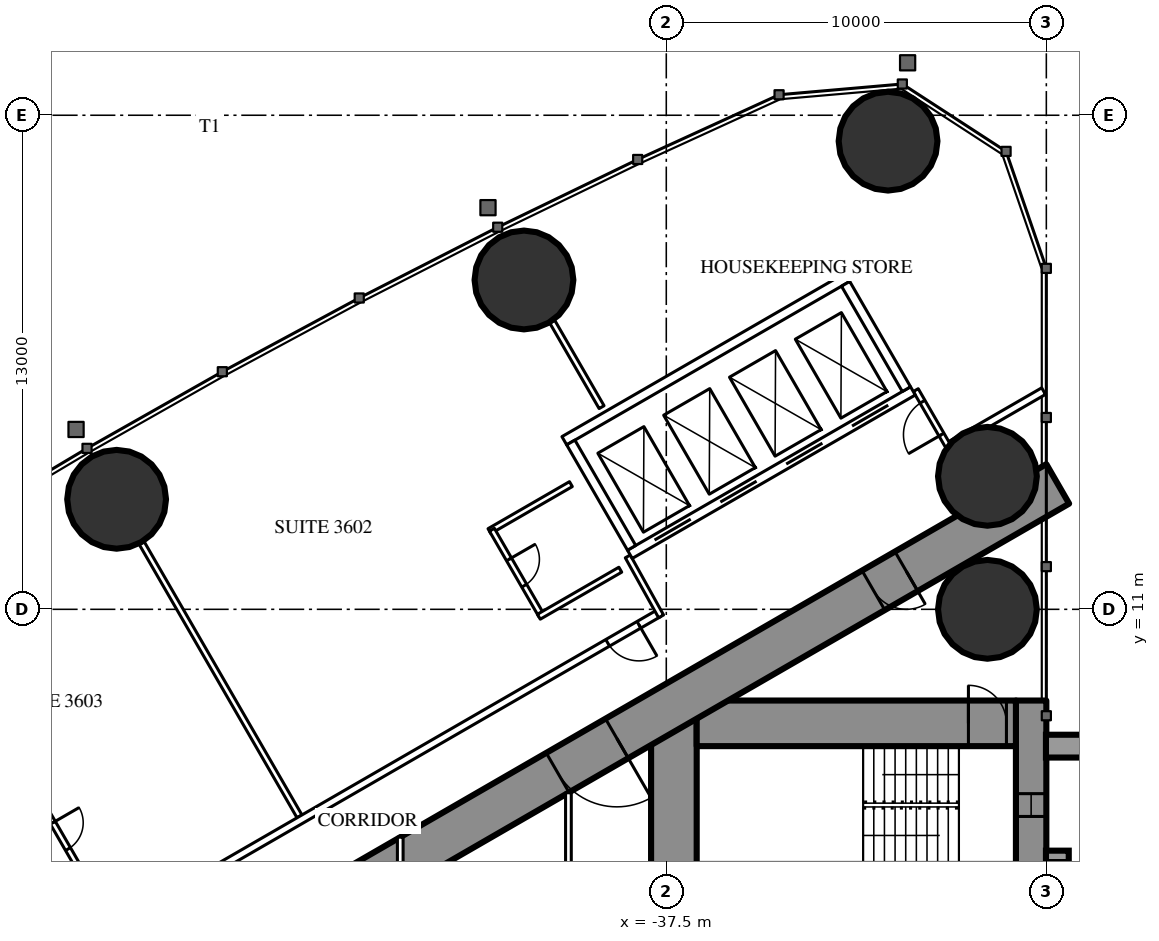
"""IFC4 building model, lengths in metres.
Left out: names, types, materials, properties, quantities, classifications, styles, units other than length and angle.
Written with IfcOpenShell. Run it as: python <this file> out.ifc"""

import sys

from ifc_helpers import new_model, si_unit, direction, frame, frame_2d, origin, origin_2d, place, context, subcontext, project, spatial, rectangle, hollow_circle, extrude, element, fill, save


model = new_model("IFC4")
c1 = context("Model", 3, precision=1e-05, world=origin(), true_north=direction((0.0, 1.0)))
c2 = subcontext(c1, "Body", "Model", "MODEL_VIEW")
j1 = project(units=[si_unit("LENGTHUNIT", "METRE"), si_unit("PLANEANGLEUNIT", "RADIAN")], contexts=[c1])
p1 = place(None, origin())
s1 = spatial("IfcSite", under=j1, at=p1, CompositionType="ELEMENT")
p2 = place(p1, origin())
s2 = spatial("IfcBuilding", under=s1, at=p2, CompositionType="ELEMENT")
p3 = place(p2, frame((0.0, 0.0, 136.1)))
s3 = spatial("IfcBuildingStorey", under=s2, at=p3, CompositionType="ELEMENT", Elevation=136.1)
for number, where, z_axis, x_axis in (
    (1, (-31.665, 23.318, 0.0), (0.0, 0.0, 1.0), (1.0, 0.0, 0.0)),
    (2, (-29.05, 11.0, 0.0), (0.0, 0.0, 1.0), (1.0, 0.0, 0.0)),
    (3, (-29.05, 14.5, 0.0), (0.0, 0.0, 1.0), (1.0, 0.0, 0.0)),
    (4, (-41.245, 19.666, 0.0), (0.0, 0.0, 1.0), (1.0, 0.0, 0.0)),
    (5, (-51.963, 13.895, 0.0), (0.0, 0.0, 1.0), (1.0, 0.0, 0.0)),
):
    element("IfcColumn", number, at=place(p3, frame(where, z_axis=z_axis, x_axis=x_axis)), inside=s3, PredefinedType="COLUMN", context=c2, shape_type="SweptSolid", body=[
        extrude(hollow_circle(Radius=1.3, WallThickness=0.1, at=origin_2d()), origin(), (0.0, 0.0, 1.0), 3.5),
    ])
p4 = place(p3, frame((-27.9, 8.6, 0.0), z_axis=(0.0, 0.0, 1.0), x_axis=(0.0, -1.0, 0.0)))
e6 = element("IfcWall", 6, at=p4, inside=s3, PredefinedType="SHEAR", context=c2, shape_type="SweptSolid", body=[
    extrude(rectangle(XDim=17.2, YDim=0.8, at=frame_2d((8.6, 0.0))), origin(), (0.0, 0.0, 1.0), 3.5),
])
p5 = place(p4, frame((2.45, 0.0, 0.6)))
e7 = element("IfcOpeningElement", 7, at=p5, cuts=e6, PredefinedType="OPENING", context=c2, shape_type="SweptSolid", body=[
    extrude(rectangle(XDim=0.6, YDim=2.1, at=frame_2d((0.3, 1.05))), frame((0.0, 0.41, 0.0), z_axis=(0.0, -1.0, 0.0), x_axis=(1.0, 0.0, 0.0)), (0.0, 0.0, 1.0), 0.82),
])
p6 = place(p4, frame((14.15, 0.0, 0.6)))
e8 = element("IfcOpeningElement", 8, at=p6, cuts=e6, PredefinedType="OPENING", context=c2, shape_type="SweptSolid", body=[
    extrude(rectangle(XDim=0.6, YDim=2.1, at=frame_2d((0.3, 1.05))), frame((0.0, 0.41, 0.0), z_axis=(0.0, -1.0, 0.0), x_axis=(1.0, 0.0, 0.0)), (0.0, 0.0, 1.0), 0.82),
])
p7 = place(p3, frame((-37.3, 8.6, 0.0), z_axis=(0.0, 0.0, 1.0), x_axis=(0.0, -1.0, 0.0)))
e9 = element("IfcWall", 9, at=p7, inside=s3, PredefinedType="SHEAR", context=c2, shape_type="SweptSolid", body=[
    extrude(rectangle(XDim=17.2, YDim=1.2, at=frame_2d((8.6, 0.0))), origin(), (0.0, 0.0, 1.0), 3.5),
])
p8 = place(p7, frame((7.7, 0.0, 0.0)))
e10 = element("IfcOpeningElement", 10, at=p8, cuts=e9, PredefinedType="OPENING", context=c2, shape_type="SweptSolid", body=[
    extrude(rectangle(XDim=1.8, YDim=2.2, at=frame_2d((0.9, 1.1))), frame((0.0, 0.61, 0.0), z_axis=(0.0, -1.0, 0.0), x_axis=(1.0, 0.0, 0.0)), (0.0, 0.0, 1.0), 1.22),
])
p9 = place(p3, frame((-28.3, 8.0, 0.0), z_axis=(0.0, 0.0, 1.0), x_axis=(-1.0, 0.0, 0.0)))
e11 = element("IfcWall", 11, at=p9, inside=s3, PredefinedType="SHEAR", context=c2, shape_type="SweptSolid", body=[
    extrude(rectangle(XDim=8.4, YDim=1.2, at=frame_2d((4.2, 0.0))), origin(), (0.0, 0.0, 1.0), 3.5),
])
p10 = place(p9, frame((0.25, 0.0, 0.0)))
e12 = element("IfcOpeningElement", 12, at=p10, cuts=e11, PredefinedType="OPENING", context=c2, shape_type="SweptSolid", body=[
    extrude(rectangle(XDim=1.0, YDim=2.2, at=frame_2d((0.5, 1.1))), frame((0.0, 0.61, 0.0), z_axis=(0.0, -1.0, 0.0), x_axis=(1.0, 0.0, 0.0)), (0.0, 0.0, 1.0), 1.22),
])
p11 = place(p3, frame((-27.2, 14.3, 0.0), z_axis=(0.0, 0.0, 1.0), x_axis=(-0.866026593062, -0.499997940104, 0.0)))
e13 = element("IfcWall", 13, at=p11, inside=s3, PredefinedType="SHEAR", context=c2, shape_type="SweptSolid", body=[
    extrude(rectangle(XDim=28.946, YDim=1.2, at=frame_2d((14.473, 0.0))), origin(), (0.0, 0.0, 1.0), 3.5),
])
p12 = place(p11, frame((4.6, 0.0, 0.0)))
e14 = element("IfcOpeningElement", 14, at=p12, cuts=e13, PredefinedType="OPENING", context=c2, shape_type="SweptSolid", body=[
    extrude(rectangle(XDim=1.0, YDim=2.2, at=frame_2d((0.5, 1.1))), frame((0.0, 0.61, 0.0), z_axis=(0.0, -1.0, 0.0), x_axis=(1.0, 0.0, 0.0)), (0.0, 0.0, 1.0), 1.22),
])
p13 = place(p11, frame((13.395, 0.0, 0.0)))
e15 = element("IfcOpeningElement", 15, at=p13, cuts=e13, PredefinedType="OPENING", context=c2, shape_type="SweptSolid", body=[
    extrude(rectangle(XDim=1.8, YDim=2.2, at=frame_2d((0.9, 1.1))), frame((0.0, 0.61, 0.0), z_axis=(0.0, -1.0, 0.0), x_axis=(1.0, 0.0, 0.0)), (0.0, 0.0, 1.0), 1.22),
])
p14 = place(p3, frame((-47.151, 5.552, 0.0), z_axis=(0.0, 0.0, 1.0), x_axis=(-0.500003012045, 0.866023664773, 0.0)))
e16 = element("IfcWall", 16, at=p14, inside=s3, PredefinedType="PARTITIONING", context=c2, shape_type="SweptSolid", body=[
    extrude(rectangle(XDim=8.311, YDim=0.15, at=frame_2d((4.156, 0.0))), origin(), (0.0, 0.0, 1.0), 2.2),
])
p15 = place(p3, frame((-39.202, 16.32, 0.0), z_axis=(0.0, 0.0, 1.0), x_axis=(-0.499947391036, 0.866055775454, 0.0)))
e17 = element("IfcWall", 17, at=p15, inside=s3, PredefinedType="PARTITIONING", context=c2, shape_type="SweptSolid", body=[
    extrude(rectangle(XDim=2.599, YDim=0.15, at=frame_2d((1.3, 0.0))), origin(), (0.0, 0.0, 1.0), 3.25),
])
p16 = place(p3, frame((-27.572, 16.741, 0.0), z_axis=(0.0, 0.0, 1.0), x_axis=(-0.866034618596, -0.499984039138, 0.0)))
e18 = element("IfcWall", 18, at=p16, inside=s3, PredefinedType="PARTITIONING", context=c2, shape_type="SweptSolid", body=[
    extrude(rectangle(XDim=2.854, YDim=0.2, at=frame_2d((1.427, 0.0))), origin(), (0.0, 0.0, 1.0), 3.25),
])
p17 = place(p3, frame((-37.7, 10.894, 0.0), z_axis=(0.0, 0.0, 1.0), x_axis=(-0.866027905338, -0.499995667157, 0.0)))
e19 = element("IfcWall", 19, at=p17, inside=s3, PredefinedType="PARTITIONING", context=c2, shape_type="SweptSolid", body=[
    extrude(rectangle(XDim=21.787, YDim=0.2, at=frame_2d((10.894, 0.0))), origin(), (0.0, 0.0, 1.0), 3.25),
])
p18 = place(p17, frame((17.711, 0.0, 0.0)))
e20 = element("IfcOpeningElement", 20, at=p18, cuts=e19, PredefinedType="OPENING", context=c2, shape_type="SweptSolid", body=[
    extrude(rectangle(XDim=0.95, YDim=2.2, at=frame_2d((0.475, 1.1))), frame((0.0, 0.11, 0.0), z_axis=(0.0, -1.0, 0.0), x_axis=(1.0, 0.0, 0.0)), (0.0, 0.0, 1.0), 0.22),
])
p19 = place(p17, frame((19.399, 0.0, 0.0)))
e21 = element("IfcOpeningElement", 21, at=p19, cuts=e19, PredefinedType="OPENING", context=c2, shape_type="SweptSolid", body=[
    extrude(rectangle(XDim=1.8, YDim=2.2, at=frame_2d((0.9, 1.1))), frame((0.0, 0.11, 0.0), z_axis=(0.0, -1.0, 0.0), x_axis=(1.0, 0.0, 0.0)), (0.0, 0.0, 1.0), 0.22),
])
p20 = place(p17, frame((0.6, 0.0, 0.0)))
e22 = element("IfcOpeningElement", 22, at=p20, cuts=e19, PredefinedType="OPENING", context=c2, shape_type="SweptSolid", body=[
    extrude(rectangle(XDim=0.95, YDim=2.2, at=frame_2d((0.475, 1.1))), frame((0.0, 0.11, 0.0), z_axis=(0.0, -1.0, 0.0), x_axis=(1.0, 0.0, 0.0)), (0.0, 0.0, 1.0), 0.22),
])
p21 = place(p3, frame((-38.513, 12.392, 0.0), z_axis=(0.0, 0.0, 1.0), x_axis=(0.485585508183, -0.874189175317, 0.0)))
e23 = element("IfcWall", 23, at=p21, inside=s3, PredefinedType="PARTITIONING", context=c2, shape_type="SweptSolid", body=[
    extrude(rectangle(XDim=1.805, YDim=0.15, at=frame_2d((0.902, 0.0))), origin(), (0.0, 0.0, 1.0), 3.25),
])
p22 = place(p3, frame((-30.033, 15.205, 0.0), z_axis=(0.0, 0.0, 1.0), x_axis=(-0.499980071345, 0.866036909293, 0.0)))
e24 = element("IfcWall", 24, at=p22, inside=s3, PredefinedType="PARTITIONING", context=c2, shape_type="SweptSolid", body=[
    extrude(rectangle(XDim=1.805, YDim=0.15, at=frame_2d((0.902, 0.0))), origin(), (0.0, 0.0, 1.0), 2.2),
])
p23 = place(p22, frame((0.452, 0.0, 0.0)))
e25 = element("IfcOpeningElement", 25, at=p23, cuts=e24, PredefinedType="OPENING", context=c2, shape_type="SweptSolid", body=[
    extrude(rectangle(XDim=1.0, YDim=2.2, at=frame_2d((0.5, 1.1))), frame((0.0, 0.085, 0.0), z_axis=(0.0, -1.0, 0.0), x_axis=(1.0, 0.0, 0.0)), (0.0, 0.0, 1.0), 0.17),
])
p24 = place(p3, frame((-52.792, 3.912, 0.0), z_axis=(0.0, 0.0, 1.0), x_axis=(-0.500006934395, 0.866021400173, 0.0)))
e26 = element("IfcWall", 26, at=p24, inside=s3, PredefinedType="PARTITIONING", context=c2, shape_type="SweptSolid", body=[
    extrude(rectangle(XDim=2.6, YDim=0.15, at=frame_2d((1.3, 0.0))), origin(), (0.0, 0.0, 1.0), 3.25),
])
p25 = place(p24, frame((0.9, 0.0, 0.0)))
e27 = element("IfcOpeningElement", 27, at=p25, cuts=e26, PredefinedType="OPENING", context=c2, shape_type="SweptSolid", body=[
    extrude(rectangle(XDim=0.8, YDim=2.2, at=frame_2d((0.4, 1.1))), frame((0.0, 0.085, 0.0), z_axis=(0.0, -1.0, 0.0), x_axis=(1.0, 0.0, 0.0)), (0.0, 0.0, 1.0), 0.17),
])
p26 = place(p3, frame((-40.01, 14.294, 0.0), z_axis=(0.0, 0.0, 1.0), x_axis=(-0.866031185235, -0.4999899861, 0.0)))
e28 = element("IfcWall", 28, at=p26, inside=s3, PredefinedType="PARTITIONING", context=c2, shape_type="SweptSolid", body=[
    extrude(rectangle(XDim=2.475, YDim=0.15, at=frame_2d((1.238, 0.0))), origin(), (0.0, 0.0, 1.0), 3.25),
])
p27 = place(p3, frame((-40.788, 10.843, 0.0), z_axis=(0.0, 0.0, 1.0), x_axis=(-0.500006934395, 0.866021400173, 0.0)))
e29 = element("IfcWall", 29, at=p27, inside=s3, PredefinedType="PARTITIONING", context=c2, shape_type="SweptSolid", body=[
    extrude(rectangle(XDim=2.6, YDim=0.15, at=frame_2d((1.3, 0.0))), origin(), (0.0, 0.0, 1.0), 3.25),
])
p28 = place(p27, frame((0.9, 0.0, 0.0)))
e30 = element("IfcOpeningElement", 30, at=p28, cuts=e29, PredefinedType="OPENING", context=c2, shape_type="SweptSolid", body=[
    extrude(rectangle(XDim=0.8, YDim=2.2, at=frame_2d((0.4, 1.1))), frame((0.0, 0.085, 0.0), z_axis=(0.0, -1.0, 0.0), x_axis=(1.0, 0.0, 0.0)), (0.0, 0.0, 1.0), 0.17),
])
p29 = place(p3, frame((-38.71, 12.042, 0.0), z_axis=(0.0, 0.0, 1.0), x_axis=(-0.86604923931, -0.499958713387, 0.0)))
e31 = element("IfcWall", 31, at=p29, inside=s3, PredefinedType="PARTITIONING", context=c2, shape_type="SweptSolid", body=[
    extrude(rectangle(XDim=2.475, YDim=0.15, at=frame_2d((1.237, 0.0))), origin(), (0.0, 0.0, 1.0), 3.25),
])
p30 = place(p3, frame((-40.075, 6.174, 0.0), z_axis=(0.0, 0.0, 1.0), x_axis=(0.0, -1.0, 0.0)))
e32 = element("IfcWall", 32, at=p30, inside=s3, PredefinedType="PARTITIONING", context=c2, shape_type="SweptSolid", body=[
    extrude(rectangle(XDim=7.374, YDim=0.15, at=frame_2d((3.687, 0.0))), origin(), (0.0, 0.0, 1.0), 3.25),
])
p31 = place(p30, frame((2.787, 0.0, 0.0)))
e33 = element("IfcOpeningElement", 33, at=p31, cuts=e32, PredefinedType="OPENING", context=c2, shape_type="SweptSolid", body=[
    extrude(rectangle(XDim=1.8, YDim=2.2, at=frame_2d((0.9, 1.1))), frame((0.0, 0.085, 0.0), z_axis=(0.0, -1.0, 0.0), x_axis=(1.0, 0.0, 0.0)), (0.0, 0.0, 1.0), 0.17),
])
p32 = place(p3, frame((-44.5, 5.005, 0.0), z_axis=(0.0, 0.0, 1.0), x_axis=(0.0, -1.0, 0.0)))
e34 = element("IfcWall", 34, at=p32, inside=s3, PredefinedType="PARTITIONING", context=c2, shape_type="SweptSolid", body=[
    extrude(rectangle(XDim=10.009, YDim=0.15, at=frame_2d((5.005, 0.0))), origin(), (0.0, 0.0, 1.0), 2.45),
])
p33 = place(p32, frame((4.505, 0.0, 0.0)))
e35 = element("IfcOpeningElement", 35, at=p33, cuts=e34, PredefinedType="OPENING", context=c2, shape_type="SweptSolid", body=[
    extrude(rectangle(XDim=1.0, YDim=2.2, at=frame_2d((0.5, 1.1))), frame((0.0, 0.085, 0.0), z_axis=(0.0, -1.0, 0.0), x_axis=(1.0, 0.0, 0.0)), (0.0, 0.0, 1.0), 0.17),
])
p34 = place(p3, frame((-31.01, 16.747, 0.0), z_axis=(0.0, 0.0, 1.0), x_axis=(-0.866028165386, -0.499995216735, 0.0)))
e36 = element("IfcWall", 36, at=p34, inside=s3, PredefinedType="PARTITIONING", context=c2, shape_type="SweptSolid", body=[
    extrude(rectangle(XDim=8.6, YDim=0.25, at=frame_2d((4.3, 0.0))), origin(), (0.0, 0.0, 1.0), 3.25),
])
p35 = place(p34, frame((0.75, 0.0, 0.0)))
e37 = element("IfcOpeningElement", 37, at=p35, cuts=e36, PredefinedType="OPENING", context=c2, shape_type="SweptSolid", body=[
    extrude(rectangle(XDim=1.1, YDim=2.2, at=frame_2d((0.55, 1.1))), frame((0.0, 0.135, 0.0), z_axis=(0.0, -1.0, 0.0), x_axis=(1.0, 0.0, 0.0)), (0.0, 0.0, 1.0), 0.27),
])
p36 = place(p34, frame((2.75, 0.0, 0.0)))
e38 = element("IfcOpeningElement", 38, at=p36, cuts=e36, PredefinedType="OPENING", context=c2, shape_type="SweptSolid", body=[
    extrude(rectangle(XDim=1.1, YDim=2.2, at=frame_2d((0.55, 1.1))), frame((0.0, 0.135, 0.0), z_axis=(0.0, -1.0, 0.0), x_axis=(1.0, 0.0, 0.0)), (0.0, 0.0, 1.0), 0.27),
])
p37 = place(p34, frame((4.75, 0.0, 0.0)))
e39 = element("IfcOpeningElement", 39, at=p37, cuts=e36, PredefinedType="OPENING", context=c2, shape_type="SweptSolid", body=[
    extrude(rectangle(XDim=1.1, YDim=2.2, at=frame_2d((0.55, 1.1))), frame((0.0, 0.135, 0.0), z_axis=(0.0, -1.0, 0.0), x_axis=(1.0, 0.0, 0.0)), (0.0, 0.0, 1.0), 0.27),
])
p38 = place(p34, frame((6.75, 0.0, 0.0)))
e40 = element("IfcOpeningElement", 40, at=p38, cuts=e36, PredefinedType="OPENING", context=c2, shape_type="SweptSolid", body=[
    extrude(rectangle(XDim=1.1, YDim=2.2, at=frame_2d((0.55, 1.1))), frame((0.0, 0.135, 0.0), z_axis=(0.0, -1.0, 0.0), x_axis=(1.0, 0.0, 0.0)), (0.0, 0.0, 1.0), 0.27),
])
p39 = place(p3, frame((-32.736, 19.736, 0.0), z_axis=(0.0, 0.0, 1.0), x_axis=(-0.866028165386, -0.499995216735, 0.0)))
e41 = element("IfcWall", 41, at=p39, inside=s3, PredefinedType="PARTITIONING", context=c2, shape_type="SweptSolid", body=[
    extrude(rectangle(XDim=8.6, YDim=0.25, at=frame_2d((4.3, 0.0))), origin(), (0.0, 0.0, 1.0), 3.25),
])
p40 = place(p3, frame((-31.181, 16.793, 0.0), z_axis=(0.0, 0.0, 1.0), x_axis=(-0.499929347863, 0.866066190972, 0.0)))
e42 = element("IfcWall", 42, at=p40, inside=s3, PredefinedType="PARTITIONING", context=c2, shape_type="SweptSolid", body=[
    extrude(rectangle(XDim=3.201, YDim=0.25, at=frame_2d((1.6, 0.0))), origin(), (0.0, 0.0, 1.0), 3.25),
])
p41 = place(p3, frame((-38.413, 12.618, 0.0), z_axis=(0.0, 0.0, 1.0), x_axis=(-0.499872130319, 0.866099216793, 0.0)))
e43 = element("IfcWall", 43, at=p41, inside=s3, PredefinedType="PARTITIONING", context=c2, shape_type="SweptSolid", body=[
    extrude(rectangle(XDim=3.2, YDim=0.25, at=frame_2d((1.6, 0.0))), origin(), (0.0, 0.0, 1.0), 3.25),
])
p42 = place(p25, origin())
e44 = element("IfcDoor", 44, at=p42, inside=s3, OperationType="SINGLE_SWING_RIGHT", PredefinedType="DOOR", context=c2, shape_type="SweptSolid", body=[
    extrude(rectangle(XDim=0.8, YDim=2.2, at=frame_2d((0.4, 1.1))), frame((0.0, 0.025, 0.0), z_axis=(0.0, -1.0, 0.0), x_axis=(1.0, 0.0, 0.0)), (0.0, 0.0, 1.0), 0.05),
])
fill(e27, e44)
p43 = place(p28, origin())
e45 = element("IfcDoor", 45, at=p43, inside=s3, OperationType="SINGLE_SWING_RIGHT", PredefinedType="DOOR", context=c2, shape_type="SweptSolid", body=[
    extrude(rectangle(XDim=0.8, YDim=2.2, at=frame_2d((0.4, 1.1))), frame((0.0, 0.025, 0.0), z_axis=(0.0, -1.0, 0.0), x_axis=(1.0, 0.0, 0.0)), (0.0, 0.0, 1.0), 0.05),
])
fill(e30, e45)
p44 = place(p20, origin())
e46 = element("IfcDoor", 46, at=p44, inside=s3, OperationType="SINGLE_SWING_LEFT", PredefinedType="DOOR", context=c2, shape_type="SweptSolid", body=[
    extrude(rectangle(XDim=0.95, YDim=2.2, at=frame_2d((0.475, 1.1))), frame((0.0, 0.025, 0.0), z_axis=(0.0, -1.0, 0.0), x_axis=(1.0, 0.0, 0.0)), (0.0, 0.0, 1.0), 0.05),
])
fill(e22, e46)
p45 = place(p23, origin())
e47 = element("IfcDoor", 47, at=p45, inside=s3, OperationType="SINGLE_SWING_LEFT", PredefinedType="DOOR", context=c2, shape_type="SweptSolid", body=[
    extrude(rectangle(XDim=1.0, YDim=2.2, at=frame_2d((0.5, 1.1))), frame((0.0, 0.025, 0.0), z_axis=(0.0, -1.0, 0.0), x_axis=(1.0, 0.0, 0.0)), (0.0, 0.0, 1.0), 0.05),
])
fill(e25, e47)
p46 = place(p12, origin())
e48 = element("IfcDoor", 48, at=p46, inside=s3, OperationType="SINGLE_SWING_LEFT", PredefinedType="DOOR", context=c2, shape_type="SweptSolid", body=[
    extrude(rectangle(XDim=1.0, YDim=2.2, at=frame_2d((0.5, 1.1))), frame((0.0, 0.025, 0.0), z_axis=(0.0, -1.0, 0.0), x_axis=(1.0, 0.0, 0.0)), (0.0, 0.0, 1.0), 0.05),
])
fill(e14, e48)
p47 = place(p13, origin())
e49 = element("IfcDoor", 49, at=p47, inside=s3, OperationType="DOUBLE_DOOR_SINGLE_SWING", PredefinedType="DOOR", context=c2, shape_type="SweptSolid", body=[
    extrude(rectangle(XDim=1.8, YDim=2.2, at=frame_2d((0.9, 1.1))), frame((0.0, 0.025, 0.0), z_axis=(0.0, -1.0, 0.0), x_axis=(1.0, 0.0, 0.0)), (0.0, 0.0, 1.0), 0.05),
])
fill(e15, e49)
p48 = place(p10, origin())
e50 = element("IfcDoor", 50, at=p48, inside=s3, OperationType="SINGLE_SWING_RIGHT", PredefinedType="DOOR", context=c2, shape_type="SweptSolid", body=[
    extrude(rectangle(XDim=1.0, YDim=2.2, at=frame_2d((0.5, 1.1))), frame((0.0, 0.025, 0.0), z_axis=(0.0, -1.0, 0.0), x_axis=(1.0, 0.0, 0.0)), (0.0, 0.0, 1.0), 0.05),
])
fill(e12, e50)
p49 = place(p35, origin())
e51 = element("IfcDoor", 51, at=p49, inside=s3, OperationType="DOUBLE_DOOR_SLIDING", PredefinedType="USERDEFINED", context=c2, shape_type="SweptSolid", body=[
    extrude(rectangle(XDim=1.1, YDim=2.2, at=frame_2d((0.55, 1.1))), frame((0.0, 0.025, 0.0), z_axis=(0.0, -1.0, 0.0), x_axis=(1.0, 0.0, 0.0)), (0.0, 0.0, 1.0), 0.05),
])
fill(e37, e51)
p50 = place(p36, origin())
e52 = element("IfcDoor", 52, at=p50, inside=s3, OperationType="DOUBLE_DOOR_SLIDING", PredefinedType="USERDEFINED", context=c2, shape_type="SweptSolid", body=[
    extrude(rectangle(XDim=1.1, YDim=2.2, at=frame_2d((0.55, 1.1))), frame((0.0, 0.025, 0.0), z_axis=(0.0, -1.0, 0.0), x_axis=(1.0, 0.0, 0.0)), (0.0, 0.0, 1.0), 0.05),
])
fill(e38, e52)
p51 = place(p37, origin())
e53 = element("IfcDoor", 53, at=p51, inside=s3, OperationType="DOUBLE_DOOR_SLIDING", PredefinedType="USERDEFINED", context=c2, shape_type="SweptSolid", body=[
    extrude(rectangle(XDim=1.1, YDim=2.2, at=frame_2d((0.55, 1.1))), frame((0.0, 0.025, 0.0), z_axis=(0.0, -1.0, 0.0), x_axis=(1.0, 0.0, 0.0)), (0.0, 0.0, 1.0), 0.05),
])
fill(e39, e53)
p52 = place(p38, origin())
e54 = element("IfcDoor", 54, at=p52, inside=s3, OperationType="DOUBLE_DOOR_SLIDING", PredefinedType="USERDEFINED", context=c2, shape_type="SweptSolid", body=[
    extrude(rectangle(XDim=1.1, YDim=2.2, at=frame_2d((0.55, 1.1))), frame((0.0, 0.025, 0.0), z_axis=(0.0, -1.0, 0.0), x_axis=(1.0, 0.0, 0.0)), (0.0, 0.0, 1.0), 0.05),
])
fill(e40, e54)
p53 = place(p5, origin())
e55 = element("IfcWindow", 55, at=p53, inside=s3, PartitioningType="SINGLE_PANEL", PredefinedType="WINDOW", context=c2, shape_type="SweptSolid", body=[
    extrude(rectangle(XDim=0.6, YDim=2.1, at=frame_2d((0.3, 1.05))), frame((0.0, 0.03, 0.0), z_axis=(0.0, -1.0, 0.0), x_axis=(1.0, 0.0, 0.0)), (0.0, 0.0, 1.0), 0.06),
])
fill(e7, e55)
save(model, sys.argv[1])
